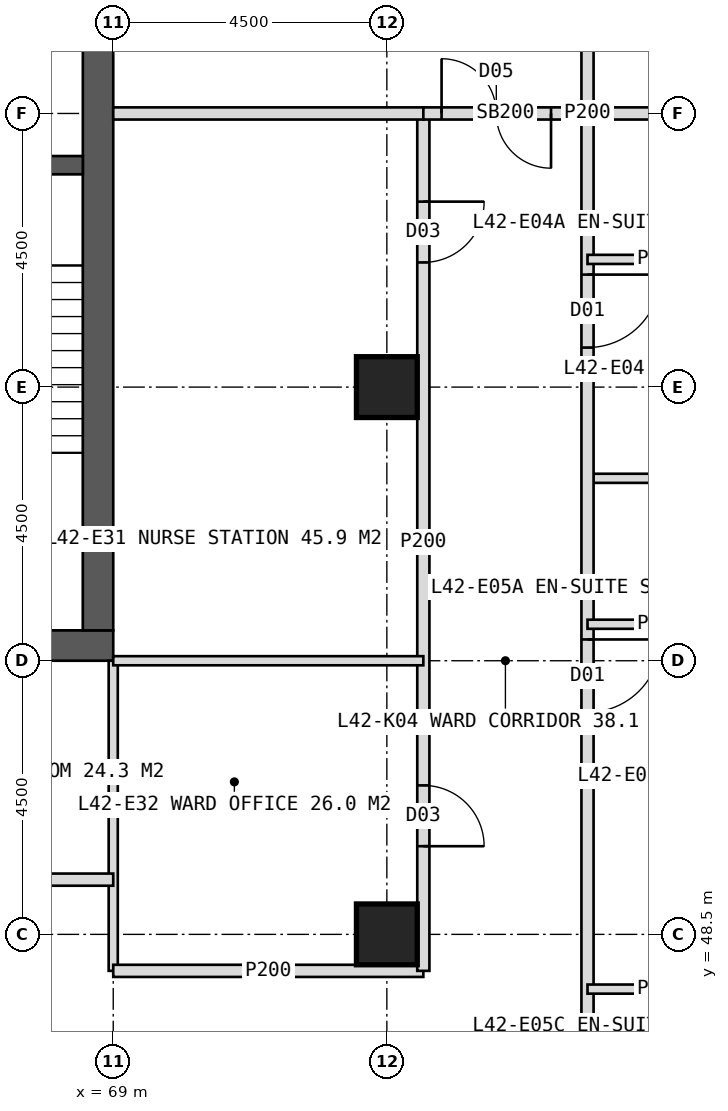
"""IFC4 building model, lengths in metres.
Left out: names, types, materials, properties, quantities, classifications, styles, units other than length and angle.
Written with IfcOpenShell. Run it as: python <this file> out.ifc"""

import sys

from ifc_helpers import new_model, si_unit, direction, frame, frame_2d, origin, origin_2d, place, context, subcontext, project, spatial, rectangle, hollow_rectangle, extrude, element, fill, save


model = new_model("IFC4")
c1 = context("Model", 3, precision=1e-05, world=origin(), true_north=direction((0.0, 1.0)))
c2 = subcontext(c1, "Body", "Model", "MODEL_VIEW")
j1 = project(units=[si_unit("LENGTHUNIT", "METRE"), si_unit("PLANEANGLEUNIT", "RADIAN")], contexts=[c1])
p1 = place(None, origin())
s1 = spatial("IfcSite", under=j1, at=p1, CompositionType="ELEMENT")
p2 = place(p1, origin())
s2 = spatial("IfcBuilding", under=s1, at=p2, CompositionType="ELEMENT")
p3 = place(p2, frame((0.0, 0.0, 177.0)))
s3 = spatial("IfcBuildingStorey", under=s2, at=p3, CompositionType="ELEMENT", Elevation=177.0)
p4 = place(p3, frame((51.0, 53.25, 0.0), z_axis=(0.0, 0.0, 1.0), x_axis=(1.0, 0.0, 0.0)))
e1 = element("IfcWall", 1, at=p4, inside=s3, PredefinedType="SHEAR", context=c2, shape_type="SweptSolid", body=[
    extrude(rectangle(XDim=18.0, YDim=0.5, at=frame_2d((9.0, 0.0))), origin(), (0.0, 0.0, 1.0), 4.0),
])
p5 = place(p4, frame((8.1, 0.0, 0.0)))
e2 = element("IfcOpeningElement", 2, at=p5, cuts=e1, PredefinedType="OPENING", context=c2, shape_type="SweptSolid", body=[
    extrude(rectangle(XDim=1.8, YDim=2.2, at=frame_2d((0.9, 1.1))), frame((0.0, 0.26, 0.0), z_axis=(0.0, -1.0, 0.0), x_axis=(1.0, 0.0, 0.0)), (0.0, 0.0, 1.0), 0.52),
])
p6 = place(p3, frame((68.75, 53.5, 0.0), z_axis=(0.0, 0.0, 1.0), x_axis=(0.0, 1.0, 0.0)))
e3 = element("IfcWall", 3, at=p6, inside=s3, PredefinedType="SHEAR", context=c2, shape_type="SweptSolid", body=[
    extrude(rectangle(XDim=17.0, YDim=0.5, at=frame_2d((8.5, 0.0))), origin(), (0.0, 0.0, 1.0), 4.0),
])
p7 = place(p6, frame((9.6, 0.0, 0.0)))
e4 = element("IfcOpeningElement", 4, at=p7, cuts=e3, PredefinedType="OPENING", context=c2, shape_type="SweptSolid", body=[
    extrude(rectangle(XDim=1.5, YDim=2.2, at=frame_2d((0.75, 1.1))), frame((0.0, 0.26, 0.0), z_axis=(0.0, -1.0, 0.0), x_axis=(1.0, 0.0, 0.0)), (0.0, 0.0, 1.0), 0.52),
])
p8 = place(p3, frame((65.2, 61.15, 0.0), z_axis=(0.0, 0.0, 1.0), x_axis=(1.0, 0.0, 0.0)))
e5 = element("IfcWall", 5, at=p8, inside=s3, PredefinedType="SHEAR", context=c2, shape_type="SweptSolid", body=[
    extrude(rectangle(XDim=3.3, YDim=0.3, at=frame_2d((1.65, 0.0))), origin(), (0.0, 0.0, 1.0), 4.0),
])
p9 = place(p8, frame((1.05, 0.0, 0.0)))
e6 = element("IfcOpeningElement", 6, at=p9, cuts=e5, PredefinedType="OPENING", context=c2, shape_type="SweptSolid", body=[
    extrude(rectangle(XDim=1.2, YDim=2.1, at=frame_2d((0.6, 1.05))), frame((0.0, 0.16, 0.0), z_axis=(0.0, -1.0, 0.0), x_axis=(1.0, 0.0, 0.0)), (0.0, 0.0, 1.0), 0.32),
])
for number, where, z_axis, x_axis in (
    (7, (73.5, 48.5, 0.0), (0.0, 0.0, 1.0), (1.0, 0.0, 0.0)),
    (8, (73.5, 57.5, 0.0), (0.0, 0.0, 1.0), (1.0, 0.0, 0.0)),
):
    element("IfcColumn", number, at=place(p3, frame(where, z_axis=z_axis, x_axis=x_axis)), inside=s3, PredefinedType="COLUMN", context=c2, shape_type="SweptSolid", body=[
        extrude(hollow_rectangle(XDim=1.0, YDim=1.0, WallThickness=0.1, at=origin_2d()), origin(), (0.0, 0.0, 1.0), 4.0),
    ])
p10 = place(p3, frame((69.0, 53.0, 0.0), z_axis=(0.0, 0.0, 1.0), x_axis=(0.0, -1.0, 0.0)))
e9 = element("IfcWall", 9, at=p10, inside=s3, PredefinedType="PARTITIONING", context=c2, shape_type="SweptSolid", body=[
    extrude(rectangle(XDim=5.1, YDim=0.15, at=frame_2d((2.55, 0.0))), origin(), (0.0, 0.0, 1.0), 3.75),
])
p11 = place(p3, frame((74.1, 47.9, 0.0), z_axis=(0.0, 0.0, 1.0), x_axis=(-1.0, 0.0, 0.0)))
e10 = element("IfcWall", 10, at=p11, inside=s3, PredefinedType="PARTITIONING", context=c2, shape_type="SweptSolid", body=[
    extrude(rectangle(XDim=5.1, YDim=0.2, at=frame_2d((2.55, 0.0))), origin(), (0.0, 0.0, 1.0), 3.75),
])
p12 = place(p3, frame((69.0, 49.4, 0.0), z_axis=(0.0, 0.0, 1.0), x_axis=(-1.0, 0.0, 0.0)))
e11 = element("IfcWall", 11, at=p12, inside=s3, PredefinedType="PARTITIONING", context=c2, shape_type="SweptSolid", body=[
    extrude(rectangle(XDim=6.75, YDim=0.2, at=frame_2d((3.375, 0.0))), origin(), (0.0, 0.0, 1.0), 3.75),
])
p13 = place(p12, frame((1.45, 0.0, 0.0)))
e12 = element("IfcOpeningElement", 12, at=p13, cuts=e11, PredefinedType="OPENING", context=c2, shape_type="SweptSolid", body=[
    extrude(rectangle(XDim=1.0, YDim=2.1, at=frame_2d((0.5, 1.05))), frame((0.0, 0.11, 0.0), z_axis=(0.0, -1.0, 0.0), x_axis=(1.0, 0.0, 0.0)), (0.0, 0.0, 1.0), 0.22),
])
p14 = place(p3, frame((76.8, 62.0, 0.0), z_axis=(0.0, 0.0, 1.0), x_axis=(1.0, 0.0, 0.0)))
e13 = element("IfcWall", 13, at=p14, inside=s3, PredefinedType="SOLIDWALL", context=c2, shape_type="SweptSolid", body=[
    extrude(rectangle(XDim=5.55, YDim=0.2, at=frame_2d((2.775, 0.0))), origin(), (0.0, 0.0, 1.0), 2.95),
])
p15 = place(p3, frame((76.8, 56.0, 0.0), z_axis=(0.0, 0.0, 1.0), x_axis=(1.0, 0.0, 0.0)))
e14 = element("IfcWall", 14, at=p15, inside=s3, PredefinedType="PARTITIONING", context=c2, shape_type="SweptSolid", body=[
    extrude(rectangle(XDim=5.55, YDim=0.15, at=frame_2d((2.775, 0.0))), origin(), (0.0, 0.0, 1.0), 3.75),
])
p16 = place(p3, frame((76.8, 78.8, 0.0), z_axis=(0.0, 0.0, 1.0), x_axis=(0.0, -1.0, 0.0)))
e15 = element("IfcWall", 15, at=p16, inside=s3, PredefinedType="PARTITIONING", context=c2, shape_type="SweptSolid", body=[
    extrude(rectangle(XDim=33.6, YDim=0.2, at=frame_2d((16.8, 0.0))), origin(), (0.0, 0.0, 1.0), 3.75),
])
p17 = place(p16, frame((2.65, 0.0, 0.0)))
e16 = element("IfcOpeningElement", 16, at=p17, cuts=e15, PredefinedType="OPENING", context=c2, shape_type="SweptSolid", body=[
    extrude(rectangle(XDim=1.2, YDim=2.2, at=frame_2d((0.6, 1.1))), frame((0.0, 0.11, 0.0), z_axis=(0.0, -1.0, 0.0), x_axis=(1.0, 0.0, 0.0)), (0.0, 0.0, 1.0), 0.22),
])
p18 = place(p16, frame((7.45, 0.0, 0.0)))
e17 = element("IfcOpeningElement", 17, at=p18, cuts=e15, PredefinedType="OPENING", context=c2, shape_type="SweptSolid", body=[
    extrude(rectangle(XDim=1.2, YDim=2.2, at=frame_2d((0.6, 1.1))), frame((0.0, 0.11, 0.0), z_axis=(0.0, -1.0, 0.0), x_axis=(1.0, 0.0, 0.0)), (0.0, 0.0, 1.0), 0.22),
])
p19 = place(p16, frame((13.45, 0.0, 0.0)))
e18 = element("IfcOpeningElement", 18, at=p19, cuts=e15, PredefinedType="OPENING", context=c2, shape_type="SweptSolid", body=[
    extrude(rectangle(XDim=1.2, YDim=2.2, at=frame_2d((0.6, 1.1))), frame((0.0, 0.11, 0.0), z_axis=(0.0, -1.0, 0.0), x_axis=(1.0, 0.0, 0.0)), (0.0, 0.0, 1.0), 0.22),
])
p20 = place(p16, frame((19.45, 0.0, 0.0)))
e19 = element("IfcOpeningElement", 19, at=p20, cuts=e15, PredefinedType="OPENING", context=c2, shape_type="SweptSolid", body=[
    extrude(rectangle(XDim=1.2, YDim=2.2, at=frame_2d((0.6, 1.1))), frame((0.0, 0.11, 0.0), z_axis=(0.0, -1.0, 0.0), x_axis=(1.0, 0.0, 0.0)), (0.0, 0.0, 1.0), 0.22),
])
p21 = place(p16, frame((25.45, 0.0, 0.0)))
e20 = element("IfcOpeningElement", 20, at=p21, cuts=e15, PredefinedType="OPENING", context=c2, shape_type="SweptSolid", body=[
    extrude(rectangle(XDim=1.2, YDim=2.2, at=frame_2d((0.6, 1.1))), frame((0.0, 0.11, 0.0), z_axis=(0.0, -1.0, 0.0), x_axis=(1.0, 0.0, 0.0)), (0.0, 0.0, 1.0), 0.22),
])
for number, where, z_axis, x_axis in (
    (21, (76.8, 59.6, 0.0), (0.0, 0.0, 1.0), (1.0, 0.0, 0.0)),
    (22, (76.8, 53.6, 0.0), (0.0, 0.0, 1.0), (1.0, 0.0, 0.0)),
    (23, (76.8, 47.6, 0.0), (0.0, 0.0, 1.0), (1.0, 0.0, 0.0)),
):
    element("IfcWall", number, at=place(p3, frame(where, z_axis=z_axis, x_axis=x_axis)), inside=s3, PredefinedType="PARTITIONING", context=c2, shape_type="SweptSolid", body=[
        extrude(rectangle(XDim=2.4, YDim=0.15, at=frame_2d((1.2, 0.0))), origin(), (0.0, 0.0, 1.0), 3.75),
    ])
p22 = place(p3, frame((74.1, 62.0, 0.0), z_axis=(0.0, 0.0, 1.0), x_axis=(0.0, -1.0, 0.0)))
e24 = element("IfcWall", 24, at=p22, inside=s3, PredefinedType="PARTITIONING", context=c2, shape_type="SweptSolid", body=[
    extrude(rectangle(XDim=14.1, YDim=0.2, at=frame_2d((7.05, 0.0))), origin(), (0.0, 0.0, 1.0), 3.75),
])
p23 = place(p22, frame((1.45, 0.0, 0.0)))
e25 = element("IfcOpeningElement", 25, at=p23, cuts=e24, PredefinedType="OPENING", context=c2, shape_type="SweptSolid", body=[
    extrude(rectangle(XDim=1.0, YDim=2.1, at=frame_2d((0.5, 1.05))), frame((0.0, 0.11, 0.0), z_axis=(0.0, -1.0, 0.0), x_axis=(1.0, 0.0, 0.0)), (0.0, 0.0, 1.0), 0.22),
])
p24 = place(p22, frame((11.05, 0.0, 0.0)))
e26 = element("IfcOpeningElement", 26, at=p24, cuts=e24, PredefinedType="OPENING", context=c2, shape_type="SweptSolid", body=[
    extrude(rectangle(XDim=1.0, YDim=2.1, at=frame_2d((0.5, 1.05))), frame((0.0, 0.11, 0.0), z_axis=(0.0, -1.0, 0.0), x_axis=(1.0, 0.0, 0.0)), (0.0, 0.0, 1.0), 0.22),
])
p25 = place(p3, frame((69.0, 62.0, 0.0), z_axis=(0.0, 0.0, 1.0), x_axis=(1.0, 0.0, 0.0)))
e27 = element("IfcWall", 27, at=p25, inside=s3, PredefinedType="SOLIDWALL", context=c2, shape_type="SweptSolid", body=[
    extrude(rectangle(XDim=5.1, YDim=0.2, at=frame_2d((2.55, 0.0))), origin(), (0.0, 0.0, 1.0), 2.95),
])
p26 = place(p3, frame((69.0, 53.0, 0.0), z_axis=(0.0, 0.0, 1.0), x_axis=(1.0, 0.0, 0.0)))
e28 = element("IfcWall", 28, at=p26, inside=s3, PredefinedType="PARTITIONING", context=c2, shape_type="SweptSolid", body=[
    extrude(rectangle(XDim=5.1, YDim=0.15, at=frame_2d((2.55, 0.0))), origin(), (0.0, 0.0, 1.0), 3.75),
])
p27 = place(p3, frame((74.1, 62.0, 0.0), z_axis=(0.0, 0.0, 1.0), x_axis=(1.0, 0.0, 0.0)))
e29 = element("IfcWall", 29, at=p27, inside=s3, PredefinedType="SOLIDWALL", context=c2, shape_type="SweptSolid", body=[
    extrude(rectangle(XDim=2.7, YDim=0.2, at=frame_2d((1.35, 0.0))), origin(), (0.0, 0.0, 1.0), 2.95),
])
p28 = place(p27, frame((0.3, 0.0, 0.0)))
e30 = element("IfcOpeningElement", 30, at=p28, cuts=e29, PredefinedType="OPENING", context=c2, shape_type="SweptSolid", body=[
    extrude(rectangle(XDim=1.8, YDim=2.2, at=frame_2d((0.9, 1.1))), frame((0.0, 0.11, 0.0), z_axis=(0.0, -1.0, 0.0), x_axis=(1.0, 0.0, 0.0)), (0.0, 0.0, 1.0), 0.22),
])
p29 = place(p20, origin())
e31 = element("IfcDoor", 31, at=p29, inside=s3, OperationType="SINGLE_SWING_LEFT", PredefinedType="DOOR", context=c2, shape_type="SweptSolid", body=[
    extrude(rectangle(XDim=1.2, YDim=2.2, at=frame_2d((0.6, 1.1))), frame((0.0, 0.025, 0.0), z_axis=(0.0, -1.0, 0.0), x_axis=(1.0, 0.0, 0.0)), (0.0, 0.0, 1.0), 0.05),
])
fill(e19, e31)
p30 = place(p21, origin())
e32 = element("IfcDoor", 32, at=p30, inside=s3, OperationType="SINGLE_SWING_LEFT", PredefinedType="DOOR", context=c2, shape_type="SweptSolid", body=[
    extrude(rectangle(XDim=1.2, YDim=2.2, at=frame_2d((0.6, 1.1))), frame((0.0, 0.025, 0.0), z_axis=(0.0, -1.0, 0.0), x_axis=(1.0, 0.0, 0.0)), (0.0, 0.0, 1.0), 0.05),
])
fill(e20, e32)
p31 = place(p23, origin())
e33 = element("IfcDoor", 33, at=p31, inside=s3, OperationType="SINGLE_SWING_LEFT", PredefinedType="DOOR", context=c2, shape_type="SweptSolid", body=[
    extrude(rectangle(XDim=1.0, YDim=2.1, at=frame_2d((0.5, 1.05))), frame((0.0, 0.025, 0.0), z_axis=(0.0, -1.0, 0.0), x_axis=(1.0, 0.0, 0.0)), (0.0, 0.0, 1.0), 0.05),
])
fill(e25, e33)
p32 = place(p24, origin())
e34 = element("IfcDoor", 34, at=p32, inside=s3, OperationType="SINGLE_SWING_RIGHT", PredefinedType="DOOR", context=c2, shape_type="SweptSolid", body=[
    extrude(rectangle(XDim=1.0, YDim=2.1, at=frame_2d((0.5, 1.05))), frame((0.0, 0.025, 0.0), z_axis=(0.0, -1.0, 0.0), x_axis=(1.0, 0.0, 0.0)), (0.0, 0.0, 1.0), 0.05),
])
fill(e26, e34)
p33 = place(p28, origin())
e35 = element("IfcDoor", 35, at=p33, inside=s3, OperationType="DOUBLE_DOOR_DOUBLE_SWING", PredefinedType="DOOR", context=c2, shape_type="SweptSolid", body=[
    extrude(rectangle(XDim=1.8, YDim=2.2, at=frame_2d((0.9, 1.1))), frame((0.0, 0.025, 0.0), z_axis=(0.0, -1.0, 0.0), x_axis=(1.0, 0.0, 0.0)), (0.0, 0.0, 1.0), 0.05),
])
fill(e30, e35)
save(model, sys.argv[1])
